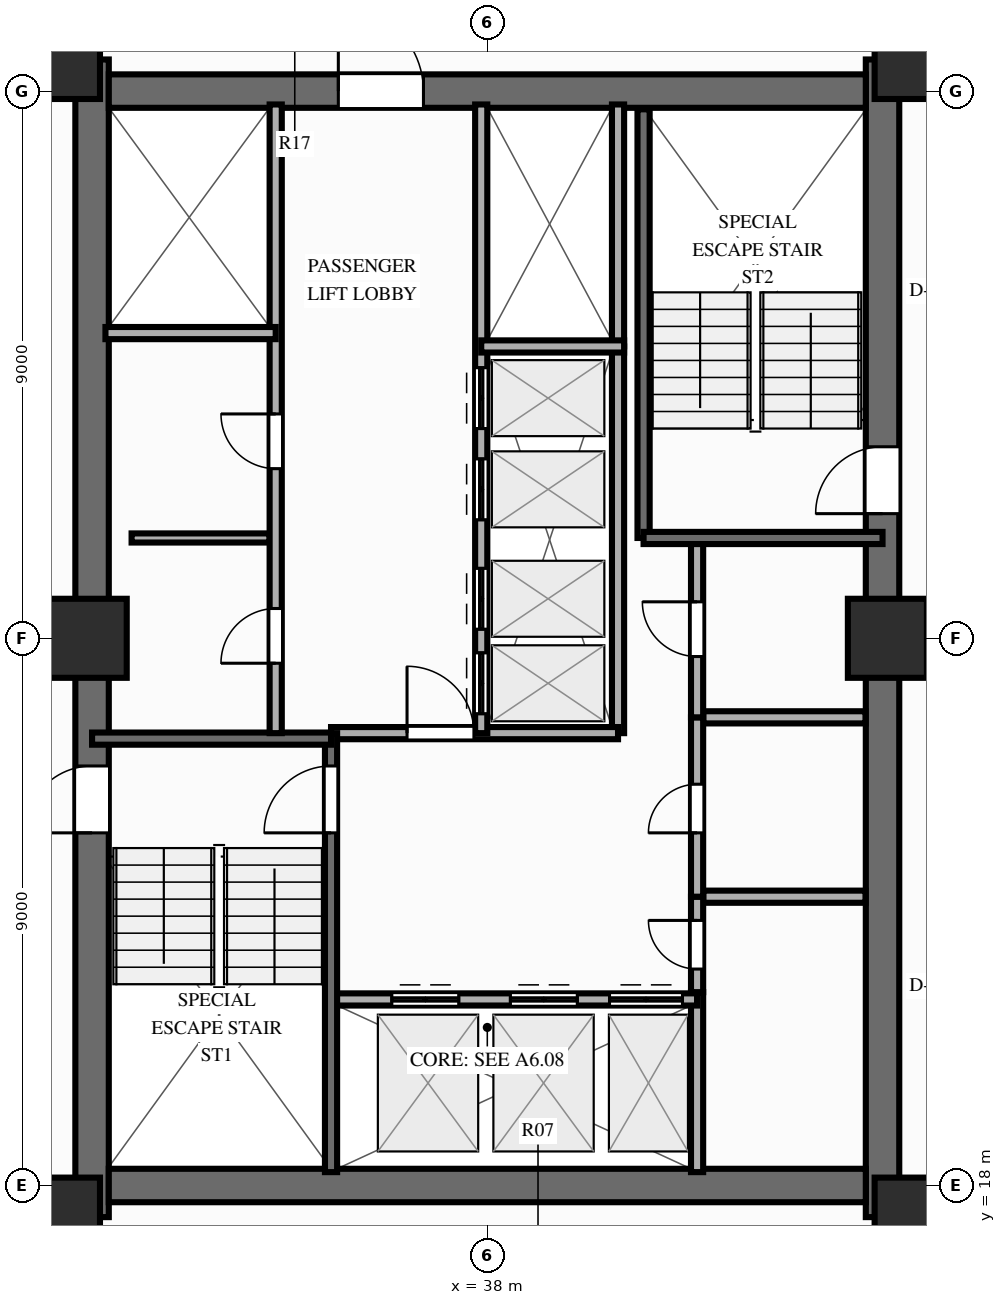
"""IFC4 building model, lengths in metres.
Left out: names, types, materials, properties, quantities, classifications, styles, units other than length and angle.
Written with IfcOpenShell. Run it as: python <this file> out.ifc"""

import sys

from ifc_helpers import new_model, si_unit, direction, frame, frame_2d, origin, origin_2d, place, context, subcontext, project, spatial, rectangle, extrude, source, transform, mapped, element, fill, save


model = new_model("IFC4")
c1 = context("Model", 3, precision=1e-05, world=origin(), true_north=direction((0.0, 1.0)))
c2 = subcontext(c1, "Body", "Model", "MODEL_VIEW")
j1 = project(units=[si_unit("LENGTHUNIT", "METRE"), si_unit("PLANEANGLEUNIT", "RADIAN")], contexts=[c1])
p1 = place(None, origin())
s1 = spatial("IfcSite", under=j1, at=p1, CompositionType="ELEMENT")
p2 = place(p1, origin())
s2 = spatial("IfcBuilding", under=s1, at=p2, CompositionType="ELEMENT")
p3 = place(p2, frame((0.0, 0.0, 101.85)))
s3 = spatial("IfcBuildingStorey", under=s2, at=p3, CompositionType="ELEMENT", Elevation=101.85)
p4 = place(p3, frame((31.5, 17.48, 0.0), z_axis=(0.0, 0.0, 1.0), x_axis=(0.0, 1.0, 0.0)))
e1 = element("IfcWall", 1, at=p4, inside=s3, PredefinedType="SHEAR", context=c2, shape_type="SweptSolid", body=[
    extrude(rectangle(XDim=19.04, YDim=0.55, at=frame_2d((9.52, 0.0))), origin(), (0.0, 0.0, 1.0), 3.0),
])
p5 = place(p4, frame((6.32, 0.0, 0.0)))
e2 = element("IfcOpeningElement", 2, at=p5, cuts=e1, PredefinedType="OPENING", context=c2, shape_type="SweptSolid", body=[
    extrude(rectangle(XDim=1.1, YDim=2.15, at=frame_2d((0.55, 1.075))), frame((0.0, 0.287, 0.0), z_axis=(0.0, -1.0, 0.0), x_axis=(1.0, 0.0, 0.0)), (0.0, 0.0, 1.0), 0.574),
])
p6 = place(p3, frame((44.5, 17.48, 0.0), z_axis=(0.0, 0.0, 1.0), x_axis=(0.0, 1.0, 0.0)))
e3 = element("IfcWall", 3, at=p6, inside=s3, PredefinedType="SHEAR", context=c2, shape_type="SweptSolid", body=[
    extrude(rectangle(XDim=19.04, YDim=0.55, at=frame_2d((9.52, 0.0))), origin(), (0.0, 0.0, 1.0), 3.0),
])
p7 = place(p6, frame((12.67, 0.0, 0.0), z_axis=(0.0, 0.0, 1.0), x_axis=(-1.0, 0.0, 0.0)))
e4 = element("IfcOpeningElement", 4, at=p7, cuts=e3, PredefinedType="OPENING", context=c2, shape_type="SweptSolid", body=[
    extrude(rectangle(XDim=1.1, YDim=2.15, at=frame_2d((0.55, 1.075))), frame((0.0, 0.287, 0.0), z_axis=(0.0, -1.0, 0.0), x_axis=(1.0, 0.0, 0.0)), (0.0, 0.0, 1.0), 0.574),
])
p8 = place(p3, frame((31.775, 18.0, 0.0), z_axis=(0.0, 0.0, 1.0), x_axis=(1.0, 0.0, 0.0)))
e5 = element("IfcWall", 5, at=p8, inside=s3, PredefinedType="SHEAR", context=c2, shape_type="SweptSolid", body=[
    extrude(rectangle(XDim=12.45, YDim=0.55, at=frame_2d((6.225, 0.0))), origin(), (0.0, 0.0, 1.0), 3.0),
])
p9 = place(p3, frame((31.775, 36.0, 0.0), z_axis=(0.0, 0.0, 1.0), x_axis=(1.0, 0.0, 0.0)))
e6 = element("IfcWall", 6, at=p9, inside=s3, PredefinedType="SHEAR", context=c2, shape_type="SweptSolid", body=[
    extrude(rectangle(XDim=12.45, YDim=0.55, at=frame_2d((6.225, 0.0))), origin(), (0.0, 0.0, 1.0), 3.0),
])
p10 = place(p9, frame((5.175, 0.0, 0.0), z_axis=(0.0, 0.0, 1.0), x_axis=(-1.0, 0.0, 0.0)))
e7 = element("IfcOpeningElement", 7, at=p10, cuts=e6, PredefinedType="OPENING", context=c2, shape_type="SweptSolid", body=[
    extrude(rectangle(XDim=1.4, YDim=2.15, at=frame_2d((0.7, 1.075))), frame((0.0, 0.287, 0.0), z_axis=(0.0, -1.0, 0.0), x_axis=(1.0, 0.0, 0.0)), (0.0, 0.0, 1.0), 0.574),
])
m1 = source(origin(), c2, "Body", "SweptSolid", [
    extrude(rectangle(XDim=1.3, YDim=1.3, at=origin_2d()), origin(), (0.0, 0.0, 1.0), 3.0),
])
for number, where, z_axis, x_axis in (
    (8, (30.98, 17.48, 0.0), (0.0, 0.0, 1.0), (1.0, 0.0, 0.0)),
    (9, (45.02, 17.48, 0.0), (0.0, 0.0, 1.0), (1.0, 0.0, 0.0)),
    (10, (30.98, 36.52, 0.0), (0.0, 0.0, 1.0), (1.0, 0.0, 0.0)),
    (11, (45.02, 36.52, 0.0), (0.0, 0.0, 1.0), (1.0, 0.0, 0.0)),
    (12, (31.42, 27.0, 0.0), (0.0, 0.0, 1.0), (1.0, 0.0, 0.0)),
    (13, (44.58, 27.0, 0.0), (0.0, 0.0, 1.0), (1.0, 0.0, 0.0)),
):
    element("IfcColumn", number, at=place(p3, frame(where, z_axis=z_axis, x_axis=x_axis)), inside=s3, PredefinedType="COLUMN", context=c2, shape_type="MappedRepresentation", body=[
        mapped(m1, transform((0.0, 0.0, 0.0), scale=1.0)),
    ])
p11 = place(p3, frame((32.15, 28.65, 0.0), z_axis=(0.0, 0.0, 1.0), x_axis=(1.0, 0.0, 0.0)))
e14 = element("IfcWall", 14, at=p11, inside=s3, PredefinedType="PARTITIONING", context=c2, shape_type="SweptSolid", body=[
    extrude(rectangle(XDim=2.27, YDim=0.15, at=frame_2d((1.135, 0.0))), origin(), (0.0, 0.0, 1.0), 2.14),
])
p12 = place(p3, frame((41.55, 22.75, 0.0), z_axis=(0.0, 0.0, 1.0), x_axis=(1.0, 0.0, 0.0)))
e15 = element("IfcWall", 15, at=p12, inside=s3, PredefinedType="PARTITIONING", context=c2, shape_type="SweptSolid", body=[
    extrude(rectangle(XDim=2.67, YDim=0.2, at=frame_2d((1.335, 0.0))), origin(), (0.0, 0.0, 1.0), 2.79),
])
p13 = place(p3, frame((41.55, 25.7, 0.0), z_axis=(0.0, 0.0, 1.0), x_axis=(1.0, 0.0, 0.0)))
e16 = element("IfcWall", 16, at=p13, inside=s3, PredefinedType="PARTITIONING", context=c2, shape_type="SweptSolid", body=[
    extrude(rectangle(XDim=2.67, YDim=0.2, at=frame_2d((1.335, 0.0))), origin(), (0.0, 0.0, 1.0), 2.14),
])
p14 = place(p3, frame((41.45, 18.22, 0.0), z_axis=(0.0, 0.0, 1.0), x_axis=(0.0, 1.0, 0.0)))
e17 = element("IfcWall", 17, at=p14, inside=s3, PredefinedType="PARTITIONING", context=c2, shape_type="SweptSolid", body=[
    extrude(rectangle(XDim=2.96, YDim=0.2, at=frame_2d((1.48, 0.0))), origin(), (0.0, 0.0, 1.0), 2.79),
])
p15 = place(p3, frame((41.45, 21.18, 0.0), z_axis=(0.0, 0.0, 1.0), x_axis=(0.0, 1.0, 0.0)))
e18 = element("IfcWall", 18, at=p15, inside=s3, PredefinedType="PARTITIONING", context=c2, shape_type="SweptSolid", body=[
    extrude(rectangle(XDim=1.57, YDim=0.2, at=frame_2d((0.785, 0.0))), origin(), (0.0, 0.0, 1.0), 2.79),
])
p16 = place(p15, frame((0.38, 0.0, 0.0)))
e19 = element("IfcOpeningElement", 19, at=p16, cuts=e18, PredefinedType="OPENING", context=c2, shape_type="SweptSolid", body=[
    extrude(rectangle(XDim=0.8, YDim=2.05, at=frame_2d((0.4, 1.025))), frame((0.0, 0.112, 0.0), z_axis=(0.0, -1.0, 0.0), x_axis=(1.0, 0.0, 0.0)), (0.0, 0.0, 1.0), 0.224),
])
p17 = place(p3, frame((41.45, 22.75, 0.0), z_axis=(0.0, 0.0, 1.0), x_axis=(0.0, 1.0, 0.0)))
e20 = element("IfcWall", 20, at=p17, inside=s3, PredefinedType="PARTITIONING", context=c2, shape_type="SweptSolid", body=[
    extrude(rectangle(XDim=2.95, YDim=0.2, at=frame_2d((1.475, 0.0))), origin(), (0.0, 0.0, 1.0), 2.79),
])
p18 = place(p17, frame((1.05, 0.0, 0.0)))
e21 = element("IfcOpeningElement", 21, at=p18, cuts=e20, PredefinedType="OPENING", context=c2, shape_type="SweptSolid", body=[
    extrude(rectangle(XDim=0.8, YDim=2.05, at=frame_2d((0.4, 1.025))), frame((0.0, 0.112, 0.0), z_axis=(0.0, -1.0, 0.0), x_axis=(1.0, 0.0, 0.0)), (0.0, 0.0, 1.0), 0.224),
])
p19 = place(p3, frame((41.45, 25.7, 0.0), z_axis=(0.0, 0.0, 1.0), x_axis=(0.0, 1.0, 0.0)))
e22 = element("IfcWall", 22, at=p19, inside=s3, PredefinedType="PARTITIONING", context=c2, shape_type="SweptSolid", body=[
    extrude(rectangle(XDim=2.9, YDim=0.2, at=frame_2d((1.45, 0.0))), origin(), (0.0, 0.0, 1.0), 2.79),
])
p20 = place(p19, frame((1.0, 0.0, 0.0)))
e23 = element("IfcOpeningElement", 23, at=p20, cuts=e22, PredefinedType="OPENING", context=c2, shape_type="SweptSolid", body=[
    extrude(rectangle(XDim=0.9, YDim=2.1, at=frame_2d((0.45, 1.05))), frame((0.0, 0.112, 0.0), z_axis=(0.0, -1.0, 0.0), x_axis=(1.0, 0.0, 0.0)), (0.0, 0.0, 1.0), 0.224),
])
p21 = place(p3, frame((40.15, 25.44, 0.0), z_axis=(0.0, 0.0, 1.0), x_axis=(0.0, 1.0, 0.0)))
e24 = element("IfcWall", 24, at=p21, inside=s3, PredefinedType="PARTITIONING", context=c2, shape_type="SweptSolid", body=[
    extrude(rectangle(XDim=6.36, YDim=0.2, at=frame_2d((3.18, 0.0))), origin(), (0.0, 0.0, 1.0), 2.79),
])
p22 = place(p3, frame((40.15, 31.8, 0.0), z_axis=(0.0, 0.0, 1.0), x_axis=(0.0, 1.0, 0.0)))
e25 = element("IfcWall", 25, at=p22, inside=s3, PredefinedType="PARTITIONING", context=c2, shape_type="SweptSolid", body=[
    extrude(rectangle(XDim=3.98, YDim=0.2, at=frame_2d((1.99, 0.0))), origin(), (0.0, 0.0, 1.0), 2.79),
])
p23 = place(p3, frame((35.43, 21.06, 0.0), z_axis=(0.0, 0.0, 1.0), x_axis=(1.0, 0.0, 0.0)))
e26 = element("IfcWall", 26, at=p23, inside=s3, PredefinedType="PARTITIONING", context=c2, shape_type="SweptSolid", body=[
    extrude(rectangle(XDim=6.02, YDim=0.2, at=frame_2d((3.01, 0.0))), origin(), (0.0, 0.0, 1.0), 2.79),
])
p24 = place(p23, frame((1.0, 0.0, 0.0)))
e27 = element("IfcOpeningElement", 27, at=p24, cuts=e26, PredefinedType="OPENING", context=c2, shape_type="SweptSolid", body=[
    extrude(rectangle(XDim=1.1, YDim=2.15, at=frame_2d((0.55, 1.075))), frame((0.0, 0.112, 0.0), z_axis=(0.0, -1.0, 0.0), x_axis=(1.0, 0.0, 0.0)), (0.0, 0.0, 1.0), 0.224),
])
p25 = place(p23, frame((2.95, 0.0, 0.0)))
e28 = element("IfcOpeningElement", 28, at=p25, cuts=e26, PredefinedType="OPENING", context=c2, shape_type="SweptSolid", body=[
    extrude(rectangle(XDim=1.1, YDim=2.15, at=frame_2d((0.55, 1.075))), frame((0.0, 0.112, 0.0), z_axis=(0.0, -1.0, 0.0), x_axis=(1.0, 0.0, 0.0)), (0.0, 0.0, 1.0), 0.224),
])
p26 = place(p23, frame((4.58, 0.0, 0.0)))
e29 = element("IfcOpeningElement", 29, at=p26, cuts=e26, PredefinedType="OPENING", context=c2, shape_type="SweptSolid", body=[
    extrude(rectangle(XDim=1.2, YDim=2.15, at=frame_2d((0.6, 1.075))), frame((0.0, 0.112, 0.0), z_axis=(0.0, -1.0, 0.0), x_axis=(1.0, 0.0, 0.0)), (0.0, 0.0, 1.0), 0.224),
])
p27 = place(p3, frame((35.43, 25.44, 0.0), z_axis=(0.0, 0.0, 1.0), x_axis=(1.0, 0.0, 0.0)))
e30 = element("IfcWall", 30, at=p27, inside=s3, PredefinedType="PARTITIONING", context=c2, shape_type="SweptSolid", body=[
    extrude(rectangle(XDim=4.72, YDim=0.2, at=frame_2d((2.36, 0.0))), origin(), (0.0, 0.0, 1.0), 2.79),
])
p28 = place(p27, frame((1.25, 0.0, 0.0)))
e31 = element("IfcOpeningElement", 31, at=p28, cuts=e30, PredefinedType="OPENING", context=c2, shape_type="SweptSolid", body=[
    extrude(rectangle(XDim=1.1, YDim=2.15, at=frame_2d((0.55, 1.075))), frame((0.0, 0.112, 0.0), z_axis=(0.0, -1.0, 0.0), x_axis=(1.0, 0.0, 0.0)), (0.0, 0.0, 1.0), 0.224),
])
p29 = place(p3, frame((35.43, 18.22, 0.0), z_axis=(0.0, 0.0, 1.0), x_axis=(0.0, 1.0, 0.0)))
e32 = element("IfcWall", 32, at=p29, inside=s3, PredefinedType="SOLIDWALL", context=c2, shape_type="SweptSolid", body=[
    extrude(rectangle(XDim=7.22, YDim=0.2, at=frame_2d((3.61, 0.0))), origin(), (0.0, 0.0, 1.0), 2.79),
])
p30 = place(p29, frame((6.68, 0.0, 0.0), z_axis=(0.0, 0.0, 1.0), x_axis=(-1.0, 0.0, 0.0)))
e33 = element("IfcOpeningElement", 33, at=p30, cuts=e32, PredefinedType="OPENING", context=c2, shape_type="SweptSolid", body=[
    extrude(rectangle(XDim=1.1, YDim=2.15, at=frame_2d((0.55, 1.075))), frame((0.0, 0.112, 0.0), z_axis=(0.0, -1.0, 0.0), x_axis=(1.0, 0.0, 0.0)), (0.0, 0.0, 1.0), 0.224),
])
p31 = place(p3, frame((31.5, 25.35, 0.0), z_axis=(0.0, 0.0, 1.0), x_axis=(1.0, 0.0, 0.0)))
e34 = element("IfcWall", 34, at=p31, inside=s3, PredefinedType="SOLIDWALL", context=c2, shape_type="SweptSolid", body=[
    extrude(rectangle(XDim=3.93, YDim=0.2, at=frame_2d((1.965, 0.0))), origin(), (0.0, 0.0, 1.0), 2.79),
])
p32 = place(p3, frame((40.57, 28.65, 0.0), z_axis=(0.0, 0.0, 1.0), x_axis=(0.0, 1.0, 0.0)))
e35 = element("IfcWall", 35, at=p32, inside=s3, PredefinedType="SOLIDWALL", context=c2, shape_type="SweptSolid", body=[
    extrude(rectangle(XDim=7.05, YDim=0.2, at=frame_2d((3.525, 0.0))), origin(), (0.0, 0.0, 1.0), 2.79),
])
p33 = place(p3, frame((40.57, 28.65, 0.0), z_axis=(0.0, 0.0, 1.0), x_axis=(1.0, 0.0, 0.0)))
e36 = element("IfcWall", 36, at=p33, inside=s3, PredefinedType="SOLIDWALL", context=c2, shape_type="SweptSolid", body=[
    extrude(rectangle(XDim=3.93, YDim=0.2, at=frame_2d((1.965, 0.0))), origin(), (0.0, 0.0, 1.0), 2.79),
])
p34 = place(p3, frame((34.52, 25.44, 0.0), z_axis=(0.0, 0.0, 1.0), x_axis=(0.0, 1.0, 0.0)))
e37 = element("IfcWall", 37, at=p34, inside=s3, PredefinedType="PARTITIONING", context=c2, shape_type="SweptSolid", body=[
    extrude(rectangle(XDim=10.34, YDim=0.2, at=frame_2d((5.17, 0.0))), origin(), (0.0, 0.0, 1.0), 2.79),
])
p35 = place(p34, frame((1.15, 0.0, 0.0)))
e38 = element("IfcOpeningElement", 38, at=p35, cuts=e37, PredefinedType="OPENING", context=c2, shape_type="SweptSolid", body=[
    extrude(rectangle(XDim=0.9, YDim=2.1, at=frame_2d((0.45, 1.05))), frame((0.0, 0.112, 0.0), z_axis=(0.0, -1.0, 0.0), x_axis=(1.0, 0.0, 0.0)), (0.0, 0.0, 1.0), 0.224),
])
p36 = place(p34, frame((4.35, 0.0, 0.0)))
e39 = element("IfcOpeningElement", 39, at=p36, cuts=e37, PredefinedType="OPENING", context=c2, shape_type="SweptSolid", body=[
    extrude(rectangle(XDim=0.9, YDim=2.1, at=frame_2d((0.45, 1.05))), frame((0.0, 0.112, 0.0), z_axis=(0.0, -1.0, 0.0), x_axis=(1.0, 0.0, 0.0)), (0.0, 0.0, 1.0), 0.224),
])
p37 = place(p3, frame((31.72, 32.02, 0.0), z_axis=(0.0, 0.0, 1.0), x_axis=(1.0, 0.0, 0.0)))
e40 = element("IfcWall", 40, at=p37, inside=s3, PredefinedType="PARTITIONING", context=c2, shape_type="SweptSolid", body=[
    extrude(rectangle(XDim=2.8, YDim=0.2, at=frame_2d((1.4, 0.0))), origin(), (0.0, 0.0, 1.0), 2.79),
])
p38 = place(p3, frame((37.9, 25.44, 0.0), z_axis=(0.0, 0.0, 1.0), x_axis=(0.0, 1.0, 0.0)))
e41 = element("IfcWall", 41, at=p38, inside=s3, PredefinedType="PARTITIONING", context=c2, shape_type="SweptSolid", body=[
    extrude(rectangle(XDim=10.34, YDim=0.2, at=frame_2d((5.17, 0.0))), origin(), (0.0, 0.0, 1.0), 2.79),
])
p39 = place(p38, frame((0.32, 0.0, 0.0)))
e42 = element("IfcOpeningElement", 42, at=p39, cuts=e41, PredefinedType="OPENING", context=c2, shape_type="SweptSolid", body=[
    extrude(rectangle(XDim=1.0, YDim=2.15, at=frame_2d((0.5, 1.075))), frame((0.0, 0.112, 0.0), z_axis=(0.0, -1.0, 0.0), x_axis=(1.0, 0.0, 0.0)), (0.0, 0.0, 1.0), 0.224),
])
p40 = place(p38, frame((1.71, 0.0, 0.0)))
e43 = element("IfcOpeningElement", 43, at=p40, cuts=e41, PredefinedType="OPENING", context=c2, shape_type="SweptSolid", body=[
    extrude(rectangle(XDim=1.0, YDim=2.15, at=frame_2d((0.5, 1.075))), frame((0.0, 0.112, 0.0), z_axis=(0.0, -1.0, 0.0), x_axis=(1.0, 0.0, 0.0)), (0.0, 0.0, 1.0), 0.224),
])
p41 = place(p38, frame((3.51, 0.0, 0.0)))
e44 = element("IfcOpeningElement", 44, at=p41, cuts=e41, PredefinedType="OPENING", context=c2, shape_type="SweptSolid", body=[
    extrude(rectangle(XDim=1.0, YDim=2.15, at=frame_2d((0.5, 1.075))), frame((0.0, 0.112, 0.0), z_axis=(0.0, -1.0, 0.0), x_axis=(1.0, 0.0, 0.0)), (0.0, 0.0, 1.0), 0.224),
])
p42 = place(p38, frame((5.01, 0.0, 0.0)))
e45 = element("IfcOpeningElement", 45, at=p42, cuts=e41, PredefinedType="OPENING", context=c2, shape_type="SweptSolid", body=[
    extrude(rectangle(XDim=1.0, YDim=2.15, at=frame_2d((0.5, 1.075))), frame((0.0, 0.112, 0.0), z_axis=(0.0, -1.0, 0.0), x_axis=(1.0, 0.0, 0.0)), (0.0, 0.0, 1.0), 0.224),
])
p43 = place(p3, frame((37.9, 31.8, 0.0), z_axis=(0.0, 0.0, 1.0), x_axis=(1.0, 0.0, 0.0)))
e46 = element("IfcWall", 46, at=p43, inside=s3, PredefinedType="PARTITIONING", context=c2, shape_type="SweptSolid", body=[
    extrude(rectangle(XDim=2.35, YDim=0.2, at=frame_2d((1.175, 0.0))), origin(), (0.0, 0.0, 1.0), 2.79),
])
m2 = source(origin(), c2, "Body", "SweptSolid", [
    extrude(rectangle(XDim=1.1, YDim=2.15, at=frame_2d((0.55, 1.075))), frame((0.0, 0.025, 0.0), z_axis=(0.0, -1.0, 0.0), x_axis=(1.0, 0.0, 0.0)), (0.0, 0.0, 1.0), 0.05),
])
p44 = place(p5, origin())
e47 = element("IfcDoor", 47, at=p44, inside=s3, OperationType="SINGLE_SWING_LEFT", PredefinedType="DOOR", context=c2, shape_type="MappedRepresentation", body=[
    mapped(m2, transform((0.0, 0.0, 0.0), scale=1.0)),
])
fill(e2, e47)
p45 = place(p7, origin())
e48 = element("IfcDoor", 48, at=p45, inside=s3, OperationType="SINGLE_SWING_RIGHT", PredefinedType="DOOR", context=c2, shape_type="MappedRepresentation", body=[
    mapped(m2, transform((0.0, 0.0, 0.0), scale=1.0)),
])
fill(e4, e48)
m3 = source(origin(), c2, "Body", "SweptSolid", [
    extrude(rectangle(XDim=1.4, YDim=2.15, at=frame_2d((0.7, 1.075))), frame((0.0, 0.025, 0.0), z_axis=(0.0, -1.0, 0.0), x_axis=(1.0, 0.0, 0.0)), (0.0, 0.0, 1.0), 0.05),
])
p46 = place(p10, origin())
e49 = element("IfcDoor", 49, at=p46, inside=s3, OperationType="SINGLE_SWING_RIGHT", PredefinedType="DOOR", context=c2, shape_type="MappedRepresentation", body=[
    mapped(m3, transform((0.0, 0.0, 0.0), scale=1.0)),
])
fill(e7, e49)
m4 = source(origin(), c2, "Body", "SweptSolid", [
    extrude(rectangle(XDim=0.8, YDim=2.05, at=frame_2d((0.4, 1.025))), frame((0.0, 0.025, 0.0), z_axis=(0.0, -1.0, 0.0), x_axis=(1.0, 0.0, 0.0)), (0.0, 0.0, 1.0), 0.05),
])
p47 = place(p16, origin())
e50 = element("IfcDoor", 50, at=p47, inside=s3, OperationType="SINGLE_SWING_RIGHT", PredefinedType="DOOR", context=c2, shape_type="MappedRepresentation", body=[
    mapped(m4, transform((0.0, 0.0, 0.0), scale=1.0)),
])
fill(e19, e50)
p48 = place(p18, origin())
e51 = element("IfcDoor", 51, at=p48, inside=s3, OperationType="SINGLE_SWING_LEFT", PredefinedType="DOOR", context=c2, shape_type="MappedRepresentation", body=[
    mapped(m4, transform((0.0, 0.0, 0.0), scale=1.0)),
])
fill(e21, e51)
m5 = source(origin(), c2, "Body", "SweptSolid", [
    extrude(rectangle(XDim=0.9, YDim=2.1, at=frame_2d((0.45, 1.05))), frame((0.0, 0.025, 0.0), z_axis=(0.0, -1.0, 0.0), x_axis=(1.0, 0.0, 0.0)), (0.0, 0.0, 1.0), 0.05),
])
p49 = place(p20, origin())
e52 = element("IfcDoor", 52, at=p49, inside=s3, OperationType="SINGLE_SWING_RIGHT", PredefinedType="DOOR", context=c2, shape_type="MappedRepresentation", body=[
    mapped(m5, transform((0.0, 0.0, 0.0), scale=1.0)),
])
fill(e23, e52)
p50 = place(p24, origin())
e53 = element("IfcDoor", 53, at=p50, inside=s3, OperationType="DOUBLE_DOOR_SLIDING", PredefinedType="DOOR", context=c2, shape_type="MappedRepresentation", body=[
    mapped(m2, transform((0.0, 0.0, 0.0), scale=1.0)),
])
fill(e27, e53)
p51 = place(p25, origin())
e54 = element("IfcDoor", 54, at=p51, inside=s3, OperationType="DOUBLE_DOOR_SLIDING", PredefinedType="DOOR", context=c2, shape_type="MappedRepresentation", body=[
    mapped(m2, transform((0.0, 0.0, 0.0), scale=1.0)),
])
fill(e28, e54)
m6 = source(origin(), c2, "Body", "SweptSolid", [
    extrude(rectangle(XDim=1.2, YDim=2.15, at=frame_2d((0.6, 1.075))), frame((0.0, 0.025, 0.0), z_axis=(0.0, -1.0, 0.0), x_axis=(1.0, 0.0, 0.0)), (0.0, 0.0, 1.0), 0.05),
])
p52 = place(p26, origin())
e55 = element("IfcDoor", 55, at=p52, inside=s3, OperationType="DOUBLE_DOOR_SLIDING", PredefinedType="DOOR", context=c2, shape_type="MappedRepresentation", body=[
    mapped(m6, transform((0.0, 0.0, 0.0), scale=1.0)),
])
fill(e29, e55)
p53 = place(p28, origin())
e56 = element("IfcDoor", 56, at=p53, inside=s3, OperationType="SINGLE_SWING_LEFT", PredefinedType="DOOR", context=c2, shape_type="MappedRepresentation", body=[
    mapped(m2, transform((0.0, 0.0, 0.0), scale=1.0)),
])
fill(e31, e56)
p54 = place(p30, origin())
e57 = element("IfcDoor", 57, at=p54, inside=s3, OperationType="SINGLE_SWING_RIGHT", PredefinedType="DOOR", context=c2, shape_type="MappedRepresentation", body=[
    mapped(m2, transform((0.0, 0.0, 0.0), scale=1.0)),
])
fill(e33, e57)
p55 = place(p35, origin())
e58 = element("IfcDoor", 58, at=p55, inside=s3, OperationType="SINGLE_SWING_LEFT", PredefinedType="DOOR", context=c2, shape_type="MappedRepresentation", body=[
    mapped(m5, transform((0.0, 0.0, 0.0), scale=1.0)),
])
fill(e38, e58)
p56 = place(p36, origin())
e59 = element("IfcDoor", 59, at=p56, inside=s3, OperationType="SINGLE_SWING_RIGHT", PredefinedType="DOOR", context=c2, shape_type="MappedRepresentation", body=[
    mapped(m5, transform((0.0, 0.0, 0.0), scale=1.0)),
])
fill(e39, e59)
m7 = source(origin(), c2, "Body", "SweptSolid", [
    extrude(rectangle(XDim=1.0, YDim=2.15, at=frame_2d((0.5, 1.075))), frame((0.0, 0.025, 0.0), z_axis=(0.0, -1.0, 0.0), x_axis=(1.0, 0.0, 0.0)), (0.0, 0.0, 1.0), 0.05),
])
p57 = place(p39, origin())
e60 = element("IfcDoor", 60, at=p57, inside=s3, OperationType="DOUBLE_DOOR_SLIDING", PredefinedType="DOOR", context=c2, shape_type="MappedRepresentation", body=[
    mapped(m7, transform((0.0, 0.0, 0.0), scale=1.0)),
])
fill(e42, e60)
p58 = place(p40, origin())
e61 = element("IfcDoor", 61, at=p58, inside=s3, OperationType="DOUBLE_DOOR_SLIDING", PredefinedType="DOOR", context=c2, shape_type="MappedRepresentation", body=[
    mapped(m7, transform((0.0, 0.0, 0.0), scale=1.0)),
])
fill(e43, e61)
p59 = place(p41, origin())
e62 = element("IfcDoor", 62, at=p59, inside=s3, OperationType="DOUBLE_DOOR_SLIDING", PredefinedType="DOOR", context=c2, shape_type="MappedRepresentation", body=[
    mapped(m7, transform((0.0, 0.0, 0.0), scale=1.0)),
])
fill(e44, e62)
p60 = place(p42, origin())
e63 = element("IfcDoor", 63, at=p60, inside=s3, OperationType="DOUBLE_DOOR_SLIDING", PredefinedType="DOOR", context=c2, shape_type="MappedRepresentation", body=[
    mapped(m7, transform((0.0, 0.0, 0.0), scale=1.0)),
])
fill(e45, e63)
save(model, sys.argv[1])
